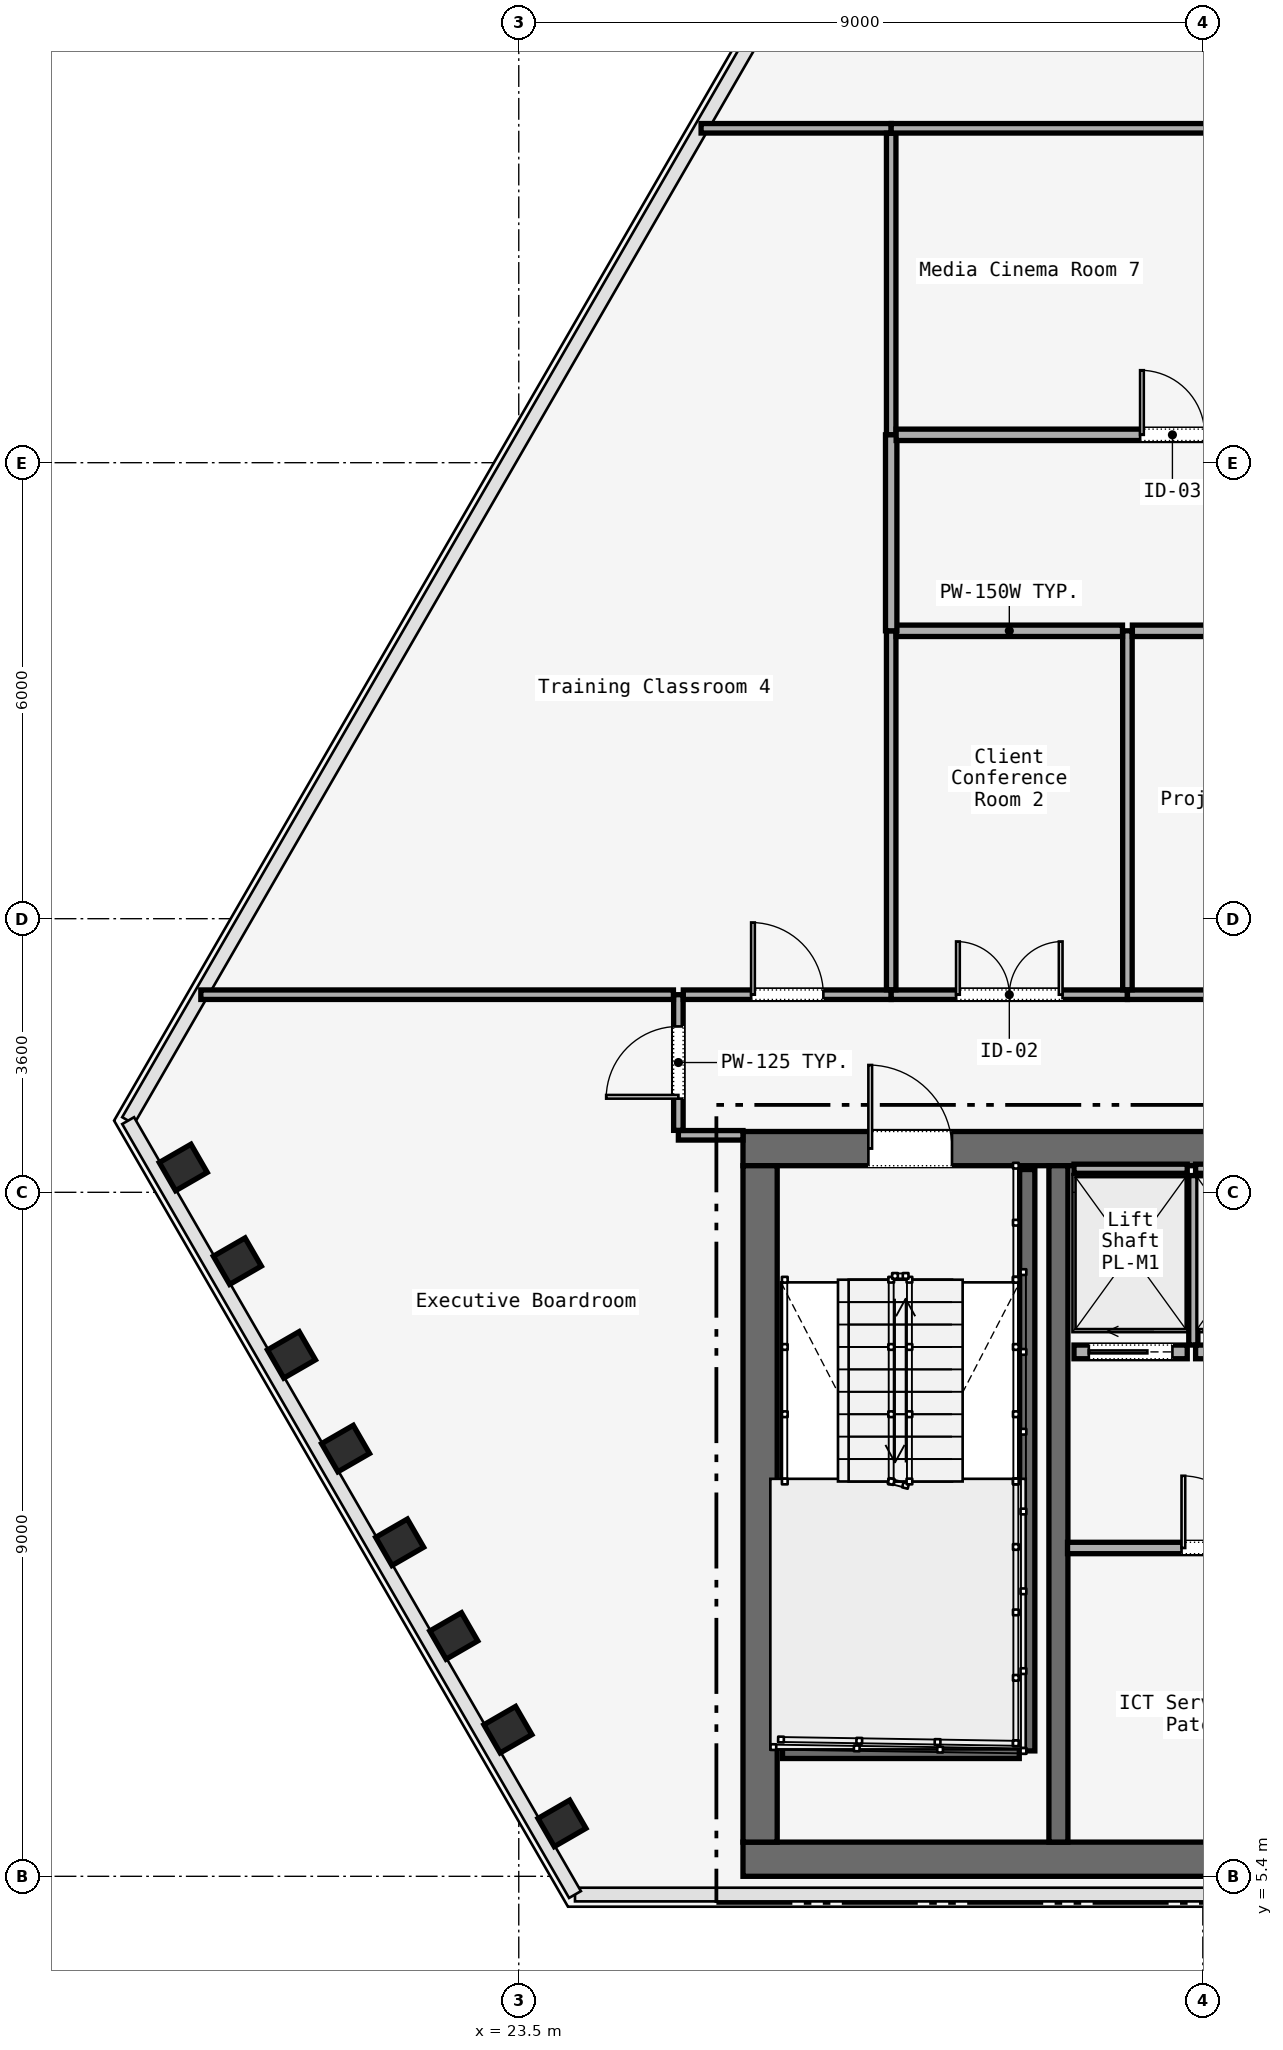
"""IFC4 building model, lengths in metres.
Left out: names, types, materials, properties, quantities, classifications, styles, units other than length and angle.
Written with IfcOpenShell. Run it as: python <this file> out.ifc"""

import sys

from ifc_helpers import new_model, si_unit, direction, frame, frame_2d, origin, origin_2d, place, context, subcontext, project, spatial, rectangle, i_section, extrude, element, fill, save


model = new_model("IFC4")
c1 = context("Model", 3, precision=1e-05, world=origin(), true_north=direction((0.0, 1.0)))
c2 = subcontext(c1, "Body", "Model", "MODEL_VIEW")
j1 = project(units=[si_unit("LENGTHUNIT", "METRE"), si_unit("PLANEANGLEUNIT", "RADIAN")], contexts=[c1])
p1 = place(None, origin())
s1 = spatial("IfcSite", under=j1, at=p1, CompositionType="ELEMENT")
p2 = place(p1, origin())
s2 = spatial("IfcBuilding", under=s1, at=p2, CompositionType="ELEMENT")
p3 = place(p2, frame((0.0, 0.0, 138.4)))
s3 = spatial("IfcBuildingStorey", under=s2, at=p3, CompositionType="ELEMENT", Elevation=138.4)
p4 = place(p3, frame((26.45, 14.975, 0.0), z_axis=(0.0, 0.0, 1.0), x_axis=(1.0, 0.0, 0.0)))
e1 = element("IfcWall", 1, at=p4, inside=s3, PredefinedType="SOLIDWALL", context=c2, shape_type="SweptSolid", body=[
    extrude(rectangle(XDim=31.1, YDim=0.45, at=frame_2d((15.55, 0.0))), origin(), (0.0, 0.0, 1.0), 3.58),
])
p5 = place(p4, frame((1.65, 0.0, 0.0)))
e2 = element("IfcOpeningElement", 2, at=p5, cuts=e1, PredefinedType="OPENING", context=c2, shape_type="SweptSolid", body=[
    extrude(rectangle(XDim=1.1, YDim=2.2, at=frame_2d((0.55, 1.1))), frame((0.0, 0.225, 0.0), z_axis=(0.0, -1.0, 0.0), x_axis=(1.0, 0.0, 0.0)), (0.0, 0.0, 1.0), 0.45),
])
p6 = place(p4, frame((13.65, 0.0, 0.0)))
e3 = element("IfcOpeningElement", 3, at=p6, cuts=e1, PredefinedType="OPENING", context=c2, shape_type="SweptSolid", body=[
    extrude(rectangle(XDim=1.1, YDim=2.2, at=frame_2d((0.55, 1.1))), frame((0.0, 0.225, 0.0), z_axis=(0.0, -1.0, 0.0), x_axis=(1.0, 0.0, 0.0)), (0.0, 0.0, 1.0), 0.45),
])
p7 = place(p4, frame((25.55, 0.0, 0.0)))
e4 = element("IfcOpeningElement", 4, at=p7, cuts=e1, PredefinedType="OPENING", context=c2, shape_type="SweptSolid", body=[
    extrude(rectangle(XDim=1.1, YDim=2.2, at=frame_2d((0.55, 1.1))), frame((0.0, 0.225, 0.0), z_axis=(0.0, -1.0, 0.0), x_axis=(1.0, 0.0, 0.0)), (0.0, 0.0, 1.0), 0.45),
])
p8 = place(p4, frame((10.7, 0.0, 0.0)))
e5 = element("IfcOpeningElement", 5, at=p8, cuts=e1, PredefinedType="OPENING", context=c2, shape_type="SweptSolid", body=[
    extrude(rectangle(XDim=1.4, YDim=2.2, at=frame_2d((0.7, 1.1))), frame((0.0, 0.225, 0.0), z_axis=(0.0, -1.0, 0.0), x_axis=(1.0, 0.0, 0.0)), (0.0, 0.0, 1.0), 0.45),
])
p9 = place(p4, frame((19.35, 0.0, 0.0)))
e6 = element("IfcOpeningElement", 6, at=p9, cuts=e1, PredefinedType="OPENING", context=c2, shape_type="SweptSolid", body=[
    extrude(rectangle(XDim=1.1, YDim=2.2, at=frame_2d((0.55, 1.1))), frame((0.0, 0.225, 0.0), z_axis=(0.0, -1.0, 0.0), x_axis=(1.0, 0.0, 0.0)), (0.0, 0.0, 1.0), 0.45),
])
p10 = place(p4, frame((21.4, 0.0, 0.0)))
e7 = element("IfcOpeningElement", 7, at=p10, cuts=e1, PredefinedType="OPENING", context=c2, shape_type="SweptSolid", body=[
    extrude(rectangle(XDim=0.9, YDim=2.1, at=frame_2d((0.45, 1.05))), frame((0.0, 0.225, 0.0), z_axis=(0.0, -1.0, 0.0), x_axis=(1.0, 0.0, 0.0)), (0.0, 0.0, 1.0), 0.45),
])
p11 = place(p4, frame((23.35, 0.0, 0.0)))
e8 = element("IfcOpeningElement", 8, at=p11, cuts=e1, PredefinedType="OPENING", context=c2, shape_type="SweptSolid", body=[
    extrude(rectangle(XDim=1.3, YDim=2.3, at=frame_2d((0.65, 1.15))), frame((0.0, 0.225, 0.0), z_axis=(0.0, -1.0, 0.0), x_axis=(1.0, 0.0, 0.0)), (0.0, 0.0, 1.0), 0.45),
])
p12 = place(p3, frame((26.45, 5.625, 0.0), z_axis=(0.0, 0.0, 1.0), x_axis=(1.0, 0.0, 0.0)))
e9 = element("IfcWall", 9, at=p12, inside=s3, PredefinedType="SOLIDWALL", context=c2, shape_type="SweptSolid", body=[
    extrude(rectangle(XDim=31.1, YDim=0.45, at=frame_2d((15.55, 0.0))), origin(), (0.0, 0.0, 1.0), 3.58),
])
p13 = place(p3, frame((26.675, 5.85, 0.0), z_axis=(0.0, 0.0, 1.0), x_axis=(0.0, 1.0, 0.0)))
e10 = element("IfcWall", 10, at=p13, inside=s3, PredefinedType="SOLIDWALL", context=c2, shape_type="SweptSolid", body=[
    extrude(rectangle(XDim=8.9, YDim=0.45, at=frame_2d((4.45, 0.0))), origin(), (0.0, 0.0, 1.0), 3.58),
])
p14 = place(p3, frame((30.6, 5.85, 0.0), z_axis=(0.0, 0.0, 1.0), x_axis=(0.0, 1.0, 0.0)))
e11 = element("IfcWall", 11, at=p14, inside=s3, PredefinedType="SOLIDWALL", context=c2, shape_type="SweptSolid", body=[
    extrude(rectangle(XDim=8.9, YDim=0.25, at=frame_2d((4.45, 0.0))), origin(), (0.0, 0.0, 1.0), 3.58),
])
for number, where, z_axis, x_axis in (
    (12, (19.086, 14.727, 0.0), (0.0, 0.0, 1.0), (-0.5, 0.866, 0.0)),
    (13, (19.798, 13.494, 0.0), (0.0, 0.0, 1.0), (-0.5, 0.866, 0.0)),
    (14, (20.51, 12.261, 0.0), (0.0, 0.0, 1.0), (-0.5, 0.866, 0.0)),
    (15, (21.221, 11.028, 0.0), (0.0, 0.0, 1.0), (-0.5, 0.866, 0.0)),
    (16, (21.933, 9.795, 0.0), (0.0, 0.0, 1.0), (-0.5, 0.866, 0.0)),
    (17, (22.645, 8.562, 0.0), (0.0, 0.0, 1.0), (-0.5, 0.866, 0.0)),
    (18, (23.357, 7.329, 0.0), (0.0, 0.0, 1.0), (-0.5, 0.866, 0.0)),
    (19, (24.069, 6.096, 0.0), (0.0, 0.0, 1.0), (-0.5, 0.866, 0.0)),
):
    element("IfcColumn", number, at=place(p3, frame(where, z_axis=z_axis, x_axis=x_axis)), inside=s3, PredefinedType="COLUMN", context=c2, shape_type="SweptSolid", body=[
        extrude(i_section(OverallWidth=0.428, OverallDepth=0.481, WebThickness=0.051, FlangeThickness=0.065, FilletRadius=0.015, at=origin_2d()), origin(), (0.0, 0.0, 1.0), 3.58),
    ])
p15 = place(p3, frame((30.19, 14.7, 0.0), z_axis=(0.0, 0.0, 1.0), x_axis=(0.0, -1.0, 0.0)))
e20 = element("IfcWall", 20, at=p15, inside=s3, PredefinedType="SOLIDWALL", context=c2, shape_type="SweptSolid", body=[
    extrude(rectangle(XDim=7.65, YDim=0.2, at=frame_2d((3.825, 0.0))), origin(), (0.0, 0.0, 1.0), 3.8),
])
p16 = place(p3, frame((26.97, 7.05, 0.0), z_axis=(0.0, 0.0, 1.0), x_axis=(1.0, 0.0, 0.0)))
e21 = element("IfcWall", 21, at=p16, inside=s3, PredefinedType="SOLIDWALL", context=c2, shape_type="SweptSolid", body=[
    extrude(rectangle(XDim=3.115, YDim=0.2, at=frame_2d((1.558, 0.0))), origin(), (0.0, 0.0, 1.0), 3.8),
])
p17 = place(p3, frame((30.72, 9.72, 0.0), z_axis=(0.0, 0.0, 1.0), x_axis=(1.0, 0.0, 0.0)))
e22 = element("IfcWall", 22, at=p17, inside=s3, PredefinedType="PARTITIONING", context=c2, shape_type="SweptSolid", body=[
    extrude(rectangle(XDim=7.96, YDim=0.15, at=frame_2d((3.98, 0.0))), origin(), (0.0, 0.0, 1.0), 3.01),
])
p18 = place(p17, frame((1.5, 0.0, 0.0)))
e23 = element("IfcOpeningElement", 23, at=p18, cuts=e22, PredefinedType="OPENING", context=c2, shape_type="SweptSolid", body=[
    extrude(rectangle(XDim=0.95, YDim=2.2, at=frame_2d((0.475, 1.1))), frame((0.0, 0.075, 0.0), z_axis=(0.0, -1.0, 0.0), x_axis=(1.0, 0.0, 0.0)), (0.0, 0.0, 1.0), 0.15),
])
p19 = place(p17, frame((4.81, 0.0, 0.0)))
e24 = element("IfcOpeningElement", 24, at=p19, cuts=e22, PredefinedType="OPENING", context=c2, shape_type="SweptSolid", body=[
    extrude(rectangle(XDim=0.95, YDim=2.2, at=frame_2d((0.475, 1.1))), frame((0.0, 0.075, 0.0), z_axis=(0.0, -1.0, 0.0), x_axis=(1.0, 0.0, 0.0)), (0.0, 0.0, 1.0), 0.15),
])
p20 = place(p3, frame((30.805, 12.3, 0.0), z_axis=(0.0, 0.0, 1.0), x_axis=(1.0, 0.0, 0.0)))
e25 = element("IfcWall", 25, at=p20, inside=s3, PredefinedType="SOLIDWALL", context=c2, shape_type="SweptSolid", body=[
    extrude(rectangle(XDim=1.49, YDim=0.18, at=frame_2d((0.745, 0.0))), origin(), (0.0, 0.0, 1.0), 3.01),
])
p21 = place(p20, frame((0.195, 0.0, 0.0)))
e26 = element("IfcOpeningElement", 26, at=p21, cuts=e25, PredefinedType="OPENING", context=c2, shape_type="SweptSolid", body=[
    extrude(rectangle(XDim=1.1, YDim=2.2, at=frame_2d((0.55, 1.1))), frame((0.0, 0.09, 0.0), z_axis=(0.0, -1.0, 0.0), x_axis=(1.0, 0.0, 0.0)), (0.0, 0.0, 1.0), 0.18),
])
p22 = place(p3, frame((30.805, 14.71, 0.0), z_axis=(0.0, 0.0, 1.0), x_axis=(1.0, 0.0, 0.0)))
e27 = element("IfcWall", 27, at=p22, inside=s3, PredefinedType="SOLIDWALL", context=c2, shape_type="SweptSolid", body=[
    extrude(rectangle(XDim=1.49, YDim=0.12, at=frame_2d((0.745, 0.0))), origin(), (0.0, 0.0, 1.0), 3.01),
])
p23 = place(p3, frame((32.375, 12.39, 0.0), z_axis=(0.0, 0.0, 1.0), x_axis=(0.0, 1.0, 0.0)))
e28 = element("IfcWall", 28, at=p23, inside=s3, PredefinedType="SOLIDWALL", context=c2, shape_type="SweptSolid", body=[
    extrude(rectangle(XDim=2.23, YDim=0.12, at=frame_2d((1.115, 0.0))), origin(), (0.0, 0.0, 1.0), 3.01),
])
p24 = place(p3, frame((32.405, 12.3, 0.0), z_axis=(0.0, 0.0, 1.0), x_axis=(1.0, 0.0, 0.0)))
e29 = element("IfcWall", 29, at=p24, inside=s3, PredefinedType="SOLIDWALL", context=c2, shape_type="SweptSolid", body=[
    extrude(rectangle(XDim=1.49, YDim=0.18, at=frame_2d((0.745, 0.0))), origin(), (0.0, 0.0, 1.0), 3.01),
])
p25 = place(p24, frame((0.195, 0.0, 0.0)))
e30 = element("IfcOpeningElement", 30, at=p25, cuts=e29, PredefinedType="OPENING", context=c2, shape_type="SweptSolid", body=[
    extrude(rectangle(XDim=1.1, YDim=2.2, at=frame_2d((0.55, 1.1))), frame((0.0, 0.09, 0.0), z_axis=(0.0, -1.0, 0.0), x_axis=(1.0, 0.0, 0.0)), (0.0, 0.0, 1.0), 0.18),
])
p26 = place(p3, frame((32.405, 14.71, 0.0), z_axis=(0.0, 0.0, 1.0), x_axis=(1.0, 0.0, 0.0)))
e31 = element("IfcWall", 31, at=p26, inside=s3, PredefinedType="SOLIDWALL", context=c2, shape_type="SweptSolid", body=[
    extrude(rectangle(XDim=1.49, YDim=0.12, at=frame_2d((0.745, 0.0))), origin(), (0.0, 0.0, 1.0), 3.01),
])
p27 = place(p3, frame((26.45, 15.15, 0.0), z_axis=(0.0, 0.0, 1.0), x_axis=(-1.0, 0.0, 0.0)))
e32 = element("IfcWall", 32, at=p27, inside=s3, PredefinedType="PARTITIONING", context=c2, shape_type="SweptSolid", body=[
    extrude(rectangle(XDim=0.85, YDim=0.125, at=frame_2d((0.425, 0.0))), origin(), (0.0, 0.0, 1.0), 3.01),
])
p28 = place(p3, frame((25.6, 15.215, 0.0), z_axis=(0.0, 0.0, 1.0), x_axis=(0.0, 1.0, 0.0)))
e33 = element("IfcWall", 33, at=p28, inside=s3, PredefinedType="PARTITIONING", context=c2, shape_type="SweptSolid", body=[
    extrude(rectangle(XDim=1.785, YDim=0.125, at=frame_2d((0.893, 0.0))), origin(), (0.0, 0.0, 1.0), 3.01),
])
p29 = place(p28, frame((0.417, 0.0, 0.0)))
e34 = element("IfcOpeningElement", 34, at=p29, cuts=e33, PredefinedType="OPENING", context=c2, shape_type="SweptSolid", body=[
    extrude(rectangle(XDim=0.95, YDim=2.2, at=frame_2d((0.475, 1.1))), frame((0.0, 0.062, 0.0), z_axis=(0.0, -1.0, 0.0), x_axis=(1.0, 0.0, 0.0)), (0.0, 0.0, 1.0), 0.125),
])
p30 = place(p3, frame((25.665, 17.0, 0.0), z_axis=(0.0, 0.0, 1.0), x_axis=(1.0, 0.0, 0.0)))
e35 = element("IfcWall", 35, at=p30, inside=s3, PredefinedType="PARTITIONING", context=c2, shape_type="SweptSolid", body=[
    extrude(rectangle(XDim=2.735, YDim=0.125, at=frame_2d((1.367, 0.0))), origin(), (0.0, 0.0, 1.0), 3.01),
])
p31 = place(p30, frame((0.893, 0.0, 0.0)))
e36 = element("IfcOpeningElement", 36, at=p31, cuts=e35, PredefinedType="OPENING", context=c2, shape_type="SweptSolid", body=[
    extrude(rectangle(XDim=0.95, YDim=2.2, at=frame_2d((0.475, 1.1))), frame((0.0, 0.062, 0.0), z_axis=(0.0, -1.0, 0.0), x_axis=(1.0, 0.0, 0.0)), (0.0, 0.0, 1.0), 0.125),
])
p32 = place(p3, frame((28.4, 17.0, 0.0), z_axis=(0.0, 0.0, 1.0), x_axis=(1.0, 0.0, 0.0)))
e37 = element("IfcWall", 37, at=p32, inside=s3, PredefinedType="PARTITIONING", context=c2, shape_type="SweptSolid", body=[
    extrude(rectangle(XDim=3.108, YDim=0.125, at=frame_2d((1.554, 0.0))), origin(), (0.0, 0.0, 1.0), 3.01),
])
p33 = place(p32, frame((0.854, 0.0, 0.0)))
e38 = element("IfcOpeningElement", 38, at=p33, cuts=e37, PredefinedType="OPENING", context=c2, shape_type="SweptSolid", body=[
    extrude(rectangle(XDim=1.4, YDim=2.2, at=frame_2d((0.7, 1.1))), frame((0.0, 0.062, 0.0), z_axis=(0.0, -1.0, 0.0), x_axis=(1.0, 0.0, 0.0)), (0.0, 0.0, 1.0), 0.125),
])
p34 = place(p3, frame((31.508, 17.0, 0.0), z_axis=(0.0, 0.0, 1.0), x_axis=(1.0, 0.0, 0.0)))
e39 = element("IfcWall", 39, at=p34, inside=s3, PredefinedType="PARTITIONING", context=c2, shape_type="SweptSolid", body=[
    extrude(rectangle(XDim=4.292, YDim=0.125, at=frame_2d((2.146, 0.0))), origin(), (0.0, 0.0, 1.0), 3.01),
])
p35 = place(p3, frame((19.317, 17.0, 0.0), z_axis=(0.0, 0.0, 1.0), x_axis=(1.0, 0.0, 0.0)))
e40 = element("IfcWall", 40, at=p35, inside=s3, PredefinedType="PARTITIONING", context=c2, shape_type="SweptSolid", body=[
    extrude(rectangle(XDim=6.218, YDim=0.125, at=frame_2d((3.109, 0.0))), origin(), (0.0, 0.0, 1.0), 3.01),
])
for number, where, z_axis, x_axis in (
    (41, (31.508, 21.788, 0.0), (0.0, 0.0, 1.0), (0.0, -1.0, 0.0)),
    (42, (28.4, 17.065, 0.0), (0.0, 0.0, 1.0), (0.0, 1.0, 0.0)),
):
    element("IfcWall", number, at=place(p3, frame(where, z_axis=z_axis, x_axis=x_axis)), inside=s3, PredefinedType="PARTITIONING", context=c2, shape_type="SweptSolid", body=[
        extrude(rectangle(XDim=4.723, YDim=0.125, at=frame_2d((2.362, 0.0))), origin(), (0.0, 0.0, 1.0), 3.01),
    ])
p36 = place(p3, frame((28.465, 21.788, 0.0), z_axis=(0.0, 0.0, 1.0), x_axis=(1.0, 0.0, 0.0)))
e43 = element("IfcWall", 43, at=p36, inside=s3, PredefinedType="PARTITIONING", context=c2, shape_type="SweptSolid", body=[
    extrude(rectangle(XDim=2.978, YDim=0.15, at=frame_2d((1.489, 0.0))), origin(), (0.0, 0.0, 1.0), 3.01),
])
p37 = place(p3, frame((31.573, 21.788, 0.0), z_axis=(0.0, 0.0, 1.0), x_axis=(1.0, 0.0, 0.0)))
e44 = element("IfcWall", 44, at=p37, inside=s3, PredefinedType="PARTITIONING", context=c2, shape_type="SweptSolid", body=[
    extrude(rectangle(XDim=4.162, YDim=0.15, at=frame_2d((2.081, 0.0))), origin(), (0.0, 0.0, 1.0), 3.01),
])
p38 = place(p3, frame((25.899, 28.4, 0.0), z_axis=(0.0, 0.0, 1.0), x_axis=(1.0, 0.0, 0.0)))
e45 = element("IfcWall", 45, at=p38, inside=s3, PredefinedType="PARTITIONING", context=c2, shape_type="SweptSolid", body=[
    extrude(rectangle(XDim=2.501, YDim=0.125, at=frame_2d((1.25, 0.0))), origin(), (0.0, 0.0, 1.0), 3.01),
])
p39 = place(p3, frame((28.4, 28.335, 0.0), z_axis=(0.0, 0.0, 1.0), x_axis=(0.0, -1.0, 0.0)))
e46 = element("IfcWall", 46, at=p39, inside=s3, PredefinedType="PARTITIONING", context=c2, shape_type="SweptSolid", body=[
    extrude(rectangle(XDim=3.968, YDim=0.125, at=frame_2d((1.984, 0.0))), origin(), (0.0, 0.0, 1.0), 3.01),
])
p40 = place(p3, frame((28.4, 24.367, 0.0), z_axis=(0.0, 0.0, 1.0), x_axis=(0.0, -1.0, 0.0)))
e47 = element("IfcWall", 47, at=p40, inside=s3, PredefinedType="PARTITIONING", context=c2, shape_type="SweptSolid", body=[
    extrude(rectangle(XDim=2.579, YDim=0.15, at=frame_2d((1.289, 0.0))), origin(), (0.0, 0.0, 1.0), 3.01),
])
p41 = place(p3, frame((28.465, 24.367, 0.0), z_axis=(0.0, 0.0, 1.0), x_axis=(1.0, 0.0, 0.0)))
e48 = element("IfcWall", 48, at=p41, inside=s3, PredefinedType="PARTITIONING", context=c2, shape_type="SweptSolid", body=[
    extrude(rectangle(XDim=7.27, YDim=0.15, at=frame_2d((3.635, 0.0))), origin(), (0.0, 0.0, 1.0), 3.01),
])
p42 = place(p41, frame((3.21, 0.0, 0.0)))
e49 = element("IfcOpeningElement", 49, at=p42, cuts=e48, PredefinedType="OPENING", context=c2, shape_type="SweptSolid", body=[
    extrude(rectangle(XDim=0.85, YDim=2.15, at=frame_2d((0.425, 1.075))), frame((0.0, 0.075, 0.0), z_axis=(0.0, -1.0, 0.0), x_axis=(1.0, 0.0, 0.0)), (0.0, 0.0, 1.0), 0.15),
])
p43 = place(p3, frame((28.4, 28.4, 0.0), z_axis=(0.0, 0.0, 1.0), x_axis=(1.0, 0.0, 0.0)))
e50 = element("IfcWall", 50, at=p43, inside=s3, PredefinedType="PARTITIONING", context=c2, shape_type="SweptSolid", body=[
    extrude(rectangle(XDim=5.0, YDim=0.125, at=frame_2d((2.5, 0.0))), origin(), (0.0, 0.0, 1.0), 3.01),
])
p44 = place(p5, origin())
e51 = element("IfcDoor", 51, at=p44, inside=s3, OperationType="SINGLE_SWING_LEFT", PredefinedType="DOOR", context=c2, shape_type="SweptSolid", body=[
    extrude(rectangle(XDim=1.1, YDim=2.2, at=frame_2d((0.55, 1.1))), frame((0.0, 0.025, 0.0), z_axis=(0.0, -1.0, 0.0), x_axis=(1.0, 0.0, 0.0)), (0.0, 0.0, 1.0), 0.05),
])
fill(e2, e51)
p45 = place(p18, origin())
e52 = element("IfcDoor", 52, at=p45, inside=s3, OperationType="SINGLE_SWING_LEFT", PredefinedType="DOOR", context=c2, shape_type="SweptSolid", body=[
    extrude(rectangle(XDim=0.95, YDim=2.2, at=frame_2d((0.475, 1.1))), frame((0.0, 0.025, 0.0), z_axis=(0.0, -1.0, 0.0), x_axis=(1.0, 0.0, 0.0)), (0.0, 0.0, 1.0), 0.05),
])
fill(e23, e52)
p46 = place(p21, origin())
e53 = element("IfcDoor", 53, at=p46, inside=s3, OperationType="SLIDING_TO_LEFT", PredefinedType="DOOR", context=c2, shape_type="SweptSolid", body=[
    extrude(rectangle(XDim=1.1, YDim=2.2, at=frame_2d((0.55, 1.1))), frame((0.0, 0.025, 0.0), z_axis=(0.0, -1.0, 0.0), x_axis=(1.0, 0.0, 0.0)), (0.0, 0.0, 1.0), 0.05),
])
fill(e26, e53)
p47 = place(p29, origin())
e54 = element("IfcDoor", 54, at=p47, inside=s3, OperationType="SINGLE_SWING_LEFT", PredefinedType="DOOR", context=c2, shape_type="SweptSolid", body=[
    extrude(rectangle(XDim=0.95, YDim=2.2, at=frame_2d((0.475, 1.1))), frame((0.0, 0.025, 0.0), z_axis=(0.0, -1.0, 0.0), x_axis=(1.0, 0.0, 0.0)), (0.0, 0.0, 1.0), 0.05),
])
fill(e34, e54)
p48 = place(p33, origin())
e55 = element("IfcDoor", 55, at=p48, inside=s3, OperationType="SINGLE_SWING_LEFT", PredefinedType="DOOR", context=c2, shape_type="SweptSolid", body=[
    extrude(rectangle(XDim=1.4, YDim=2.2, at=frame_2d((0.7, 1.1))), frame((0.0, 0.025, 0.0), z_axis=(0.0, -1.0, 0.0), x_axis=(1.0, 0.0, 0.0)), (0.0, 0.0, 1.0), 0.05),
])
fill(e38, e55)
p49 = place(p31, origin())
e56 = element("IfcDoor", 56, at=p49, inside=s3, OperationType="SINGLE_SWING_LEFT", PredefinedType="DOOR", context=c2, shape_type="SweptSolid", body=[
    extrude(rectangle(XDim=0.95, YDim=2.2, at=frame_2d((0.475, 1.1))), frame((0.0, 0.025, 0.0), z_axis=(0.0, -1.0, 0.0), x_axis=(1.0, 0.0, 0.0)), (0.0, 0.0, 1.0), 0.05),
])
fill(e36, e56)
p50 = place(p42, origin())
e57 = element("IfcDoor", 57, at=p50, inside=s3, OperationType="SINGLE_SWING_LEFT", PredefinedType="DOOR", context=c2, shape_type="SweptSolid", body=[
    extrude(rectangle(XDim=0.85, YDim=2.15, at=frame_2d((0.425, 1.075))), frame((0.0, 0.025, 0.0), z_axis=(0.0, -1.0, 0.0), x_axis=(1.0, 0.0, 0.0)), (0.0, 0.0, 1.0), 0.05),
])
fill(e49, e57)
save(model, sys.argv[1])
